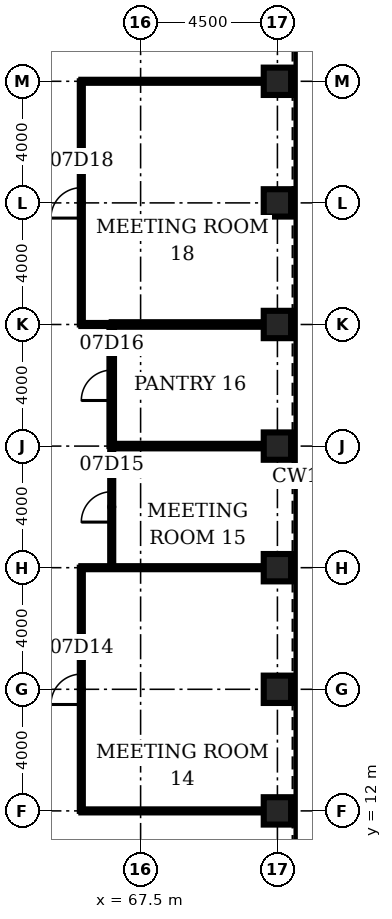
"""IFC4 building model, lengths in metres.
Left out: names, types, materials, properties, quantities, classifications, styles, units other than length and angle.
Written with IfcOpenShell. Run it as: python <this file> out.ifc"""

import sys

from ifc_helpers import new_model, si_unit, direction, frame, frame_2d, origin, origin_2d, place, context, subcontext, project, spatial, rectangle, hollow_rectangle, extrude, element, fill, save


model = new_model("IFC4")
c1 = context("Model", 3, precision=1e-05, world=origin(), true_north=direction((0.0, 1.0)))
c2 = subcontext(c1, "Body", "Model", "MODEL_VIEW")
j1 = project(units=[si_unit("LENGTHUNIT", "METRE"), si_unit("PLANEANGLEUNIT", "RADIAN")], contexts=[c1])
p1 = place(None, origin())
s1 = spatial("IfcSite", under=j1, at=p1, CompositionType="ELEMENT")
p2 = place(p1, origin())
s2 = spatial("IfcBuilding", under=s1, at=p2, CompositionType="ELEMENT")
p3 = place(p2, frame((0.0, 0.0, 36.5)))
s3 = spatial("IfcBuildingStorey", under=s2, at=p3, CompositionType="ELEMENT", Elevation=36.5)
for number, where, z_axis, x_axis in (
    (1, (72.0, 12.0, 0.0), (0.0, 0.0, 1.0), (1.0, 0.0, 0.0)),
    (2, (72.0, 16.0, 0.0), (0.0, 0.0, 1.0), (1.0, 0.0, 0.0)),
    (3, (72.0, 20.0, 0.0), (0.0, 0.0, 1.0), (1.0, 0.0, 0.0)),
    (4, (72.0, 24.0, 0.0), (0.0, 0.0, 1.0), (1.0, 0.0, 0.0)),
    (5, (72.0, 28.0, 0.0), (0.0, 0.0, 1.0), (1.0, 0.0, 0.0)),
    (6, (72.0, 32.0, 0.0), (0.0, 0.0, 1.0), (1.0, 0.0, 0.0)),
    (7, (72.0, 36.0, 0.0), (0.0, 0.0, 1.0), (1.0, 0.0, 0.0)),
):
    element("IfcColumn", number, at=place(p3, frame(where, z_axis=z_axis, x_axis=x_axis)), inside=s3, PredefinedType="COLUMN", context=c2, shape_type="SweptSolid", body=[
        extrude(hollow_rectangle(XDim=0.9, YDim=0.9, WallThickness=0.12, at=origin_2d()), origin(), (0.0, 0.0, 1.0), 4.5),
    ])
for number, where, z_axis, x_axis in (
    (8, (65.55, 12.0, 0.0), (0.0, 0.0, 1.0), (1.0, 0.0, 0.0)),
    (9, (65.55, 20.0, 0.0), (0.0, 0.0, 1.0), (1.0, 0.0, 0.0)),
):
    element("IfcWall", number, at=place(p3, frame(where, z_axis=z_axis, x_axis=x_axis)), inside=s3, PredefinedType="PARTITIONING", context=c2, shape_type="SweptSolid", body=[
        extrude(rectangle(XDim=6.0, YDim=0.1, at=frame_2d((3.0, 0.0))), origin(), (0.0, 0.0, 1.0), 3.0),
    ])
p4 = place(p3, frame((66.55, 24.0, 0.0), z_axis=(0.0, 0.0, 1.0), x_axis=(1.0, 0.0, 0.0)))
e10 = element("IfcWall", 10, at=p4, inside=s3, PredefinedType="PARTITIONING", context=c2, shape_type="SweptSolid", body=[
    extrude(rectangle(XDim=5.0, YDim=0.15, at=frame_2d((2.5, 0.0))), origin(), (0.0, 0.0, 1.0), 3.0),
])
p5 = place(p3, frame((65.55, 28.0, 0.0), z_axis=(0.0, 0.0, 1.0), x_axis=(1.0, 0.0, 0.0)))
e11 = element("IfcWall", 11, at=p5, inside=s3, PredefinedType="PARTITIONING", context=c2, shape_type="SweptSolid", body=[
    extrude(rectangle(XDim=1.0, YDim=0.1, at=frame_2d((0.5, 0.0))), origin(), (0.0, 0.0, 1.0), 3.0),
])
p6 = place(p3, frame((66.55, 28.0, 0.0), z_axis=(0.0, 0.0, 1.0), x_axis=(1.0, 0.0, 0.0)))
e12 = element("IfcWall", 12, at=p6, inside=s3, PredefinedType="PARTITIONING", context=c2, shape_type="SweptSolid", body=[
    extrude(rectangle(XDim=5.0, YDim=0.15, at=frame_2d((2.5, 0.0))), origin(), (0.0, 0.0, 1.0), 3.0),
])
p7 = place(p3, frame((65.55, 36.0, 0.0), z_axis=(0.0, 0.0, 1.0), x_axis=(1.0, 0.0, 0.0)))
e13 = element("IfcWall", 13, at=p7, inside=s3, PredefinedType="PARTITIONING", context=c2, shape_type="SweptSolid", body=[
    extrude(rectangle(XDim=6.0, YDim=0.1, at=frame_2d((3.0, 0.0))), origin(), (0.0, 0.0, 1.0), 3.0),
])
p8 = place(p3, frame((65.55, 12.0, 0.0), z_axis=(0.0, 0.0, 1.0), x_axis=(0.0, 1.0, 0.0)))
e14 = element("IfcWall", 14, at=p8, inside=s3, PredefinedType="PARTITIONING", context=c2, shape_type="SweptSolid", body=[
    extrude(rectangle(XDim=8.0, YDim=0.1, at=frame_2d((4.0, 0.0))), origin(), (0.0, 0.0, 1.0), 3.0),
])
p9 = place(p8, frame((3.5, 0.0, 0.0)))
e15 = element("IfcOpeningElement", 15, at=p9, cuts=e14, PredefinedType="OPENING", context=c2, shape_type="SweptSolid", body=[
    extrude(rectangle(XDim=1.0, YDim=2.1, at=frame_2d((0.5, 1.05))), frame((0.0, 0.06, 0.0), z_axis=(0.0, -1.0, 0.0), x_axis=(1.0, 0.0, 0.0)), (0.0, 0.0, 1.0), 0.12),
])
p10 = place(p3, frame((65.55, 28.0, 0.0), z_axis=(0.0, 0.0, 1.0), x_axis=(0.0, 1.0, 0.0)))
e16 = element("IfcWall", 16, at=p10, inside=s3, PredefinedType="PARTITIONING", context=c2, shape_type="SweptSolid", body=[
    extrude(rectangle(XDim=8.0, YDim=0.1, at=frame_2d((4.0, 0.0))), origin(), (0.0, 0.0, 1.0), 3.0),
])
p11 = place(p10, frame((3.5, 0.0, 0.0)))
e17 = element("IfcOpeningElement", 17, at=p11, cuts=e16, PredefinedType="OPENING", context=c2, shape_type="SweptSolid", body=[
    extrude(rectangle(XDim=1.0, YDim=2.1, at=frame_2d((0.5, 1.05))), frame((0.0, 0.06, 0.0), z_axis=(0.0, -1.0, 0.0), x_axis=(1.0, 0.0, 0.0)), (0.0, 0.0, 1.0), 0.12),
])
p12 = place(p3, frame((66.55, 20.0, 0.0), z_axis=(0.0, 0.0, 1.0), x_axis=(0.0, 1.0, 0.0)))
e18 = element("IfcWall", 18, at=p12, inside=s3, PredefinedType="PARTITIONING", context=c2, shape_type="SweptSolid", body=[
    extrude(rectangle(XDim=4.0, YDim=0.1, at=frame_2d((2.0, 0.0))), origin(), (0.0, 0.0, 1.0), 3.0),
])
p13 = place(p12, frame((1.5, 0.0, 0.0)))
e19 = element("IfcOpeningElement", 19, at=p13, cuts=e18, PredefinedType="OPENING", context=c2, shape_type="SweptSolid", body=[
    extrude(rectangle(XDim=1.0, YDim=2.1, at=frame_2d((0.5, 1.05))), frame((0.0, 0.06, 0.0), z_axis=(0.0, -1.0, 0.0), x_axis=(1.0, 0.0, 0.0)), (0.0, 0.0, 1.0), 0.12),
])
p14 = place(p3, frame((66.55, 24.0, 0.0), z_axis=(0.0, 0.0, 1.0), x_axis=(0.0, 1.0, 0.0)))
e20 = element("IfcWall", 20, at=p14, inside=s3, PredefinedType="PARTITIONING", context=c2, shape_type="SweptSolid", body=[
    extrude(rectangle(XDim=4.0, YDim=0.15, at=frame_2d((2.0, 0.0))), origin(), (0.0, 0.0, 1.0), 3.0),
])
p15 = place(p14, frame((1.5, 0.0, 0.0)))
e21 = element("IfcOpeningElement", 21, at=p15, cuts=e20, PredefinedType="OPENING", context=c2, shape_type="SweptSolid", body=[
    extrude(rectangle(XDim=1.0, YDim=2.1, at=frame_2d((0.5, 1.05))), frame((0.0, 0.085, 0.0), z_axis=(0.0, -1.0, 0.0), x_axis=(1.0, 0.0, 0.0)), (0.0, 0.0, 1.0), 0.17),
])
p16 = place(p9, origin())
e22 = element("IfcDoor", 22, at=p16, inside=s3, OperationType="SINGLE_SWING_LEFT", PredefinedType="DOOR", context=c2, shape_type="SweptSolid", body=[
    extrude(rectangle(XDim=1.0, YDim=2.1, at=frame_2d((0.5, 1.05))), frame((0.0, 0.025, 0.0), z_axis=(0.0, -1.0, 0.0), x_axis=(1.0, 0.0, 0.0)), (0.0, 0.0, 1.0), 0.05),
])
fill(e15, e22)
p17 = place(p13, origin())
e23 = element("IfcDoor", 23, at=p17, inside=s3, OperationType="SINGLE_SWING_LEFT", PredefinedType="DOOR", context=c2, shape_type="SweptSolid", body=[
    extrude(rectangle(XDim=1.0, YDim=2.1, at=frame_2d((0.5, 1.05))), frame((0.0, 0.025, 0.0), z_axis=(0.0, -1.0, 0.0), x_axis=(1.0, 0.0, 0.0)), (0.0, 0.0, 1.0), 0.05),
])
fill(e19, e23)
p18 = place(p15, origin())
e24 = element("IfcDoor", 24, at=p18, inside=s3, OperationType="SINGLE_SWING_LEFT", PredefinedType="DOOR", context=c2, shape_type="SweptSolid", body=[
    extrude(rectangle(XDim=1.0, YDim=2.1, at=frame_2d((0.5, 1.05))), frame((0.0, 0.025, 0.0), z_axis=(0.0, -1.0, 0.0), x_axis=(1.0, 0.0, 0.0)), (0.0, 0.0, 1.0), 0.05),
])
fill(e21, e24)
p19 = place(p11, origin())
e25 = element("IfcDoor", 25, at=p19, inside=s3, OperationType="SINGLE_SWING_LEFT", PredefinedType="DOOR", context=c2, shape_type="SweptSolid", body=[
    extrude(rectangle(XDim=1.0, YDim=2.1, at=frame_2d((0.5, 1.05))), frame((0.0, 0.025, 0.0), z_axis=(0.0, -1.0, 0.0), x_axis=(1.0, 0.0, 0.0)), (0.0, 0.0, 1.0), 0.05),
])
fill(e17, e25)
save(model, sys.argv[1])
